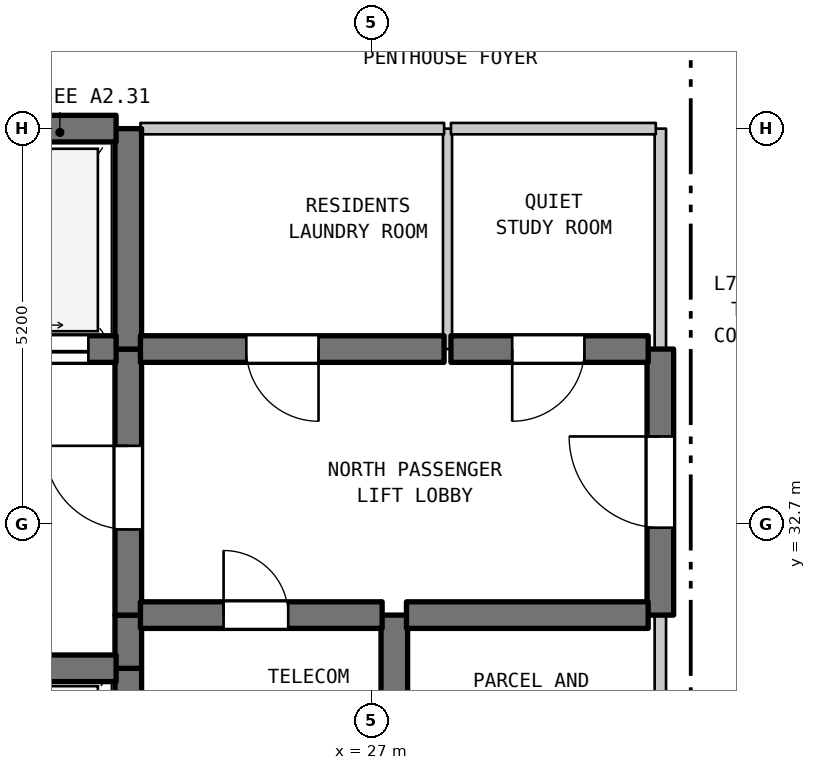
"""IFC4 building model, lengths in metres.
Left out: names, types, materials, properties, quantities, classifications, styles, units other than length and angle.
Written with IfcOpenShell. Run it as: python <this file> out.ifc"""

import sys

from ifc_helpers import new_model, si_unit, direction, frame, frame_2d, origin, place, context, subcontext, project, spatial, rectangle, extrude, element, fill, save


model = new_model("IFC4")
c1 = context("Model", 3, precision=1e-05, world=origin(), true_north=direction((0.0, 1.0)))
c2 = subcontext(c1, "Body", "Model", "MODEL_VIEW")
j1 = project(units=[si_unit("LENGTHUNIT", "METRE"), si_unit("PLANEANGLEUNIT", "RADIAN")], contexts=[c1])
p1 = place(None, origin())
s1 = spatial("IfcSite", under=j1, at=p1, CompositionType="ELEMENT")
p2 = place(p1, origin())
s2 = spatial("IfcBuilding", under=s1, at=p2, CompositionType="ELEMENT")
p3 = place(p2, frame((0.0, 0.0, 303.6)))
s3 = spatial("IfcBuildingStorey", under=s2, at=p3, CompositionType="ELEMENT", Elevation=303.6)
p4 = place(p3, frame((23.8, 28.2, 0.0), z_axis=(0.0, 0.0, 1.0), x_axis=(0.0, 1.0, 0.0)))
e1 = element("IfcWall", 1, at=p4, inside=s3, PredefinedType="SHEAR", context=c2, shape_type="SweptSolid", body=[
    extrude(rectangle(XDim=2.6, YDim=0.35, at=frame_2d((1.3, 0.0))), origin(), (0.0, 0.0, 1.0), 3.39),
])
p5 = place(p3, frame((23.8, 30.8, 0.0), z_axis=(0.0, 0.0, 1.0), x_axis=(0.0, 1.0, 0.0)))
e2 = element("IfcWall", 2, at=p5, inside=s3, PredefinedType="SHEAR", context=c2, shape_type="SweptSolid", body=[
    extrude(rectangle(XDim=0.7, YDim=0.35, at=frame_2d((0.35, 0.0))), origin(), (0.0, 0.0, 1.0), 3.39),
])
p6 = place(p3, frame((23.8, 31.5, 0.0), z_axis=(0.0, 0.0, 1.0), x_axis=(0.0, 1.0, 0.0)))
e3 = element("IfcWall", 3, at=p6, inside=s3, PredefinedType="SHEAR", context=c2, shape_type="SweptSolid", body=[
    extrude(rectangle(XDim=3.5, YDim=0.35, at=frame_2d((1.75, 0.0))), origin(), (0.0, 0.0, 1.0), 3.39),
])
p7 = place(p6, frame((1.127, 0.0, 0.0)))
e4 = element("IfcOpeningElement", 4, at=p7, cuts=e3, PredefinedType="OPENING", context=c2, shape_type="SweptSolid", body=[
    extrude(rectangle(XDim=1.1, YDim=2.15, at=frame_2d((0.55, 1.075))), frame((0.0, 0.185, 0.0), z_axis=(0.0, -1.0, 0.0), x_axis=(1.0, 0.0, 0.0)), (0.0, 0.0, 1.0), 0.37),
])
p8 = place(p3, frame((23.8, 35.0, 0.0), z_axis=(0.0, 0.0, 1.0), x_axis=(0.0, 1.0, 0.0)))
e5 = element("IfcWall", 5, at=p8, inside=s3, PredefinedType="SHEAR", context=c2, shape_type="SweptSolid", body=[
    extrude(rectangle(XDim=2.9, YDim=0.35, at=frame_2d((1.45, 0.0))), origin(), (0.0, 0.0, 1.0), 3.39),
])
p9 = place(p3, frame((27.3, 28.9, 0.0), z_axis=(0.0, 0.0, 1.0), x_axis=(0.0, 1.0, 0.0)))
e6 = element("IfcWall", 6, at=p9, inside=s3, PredefinedType="SHEAR", context=c2, shape_type="SweptSolid", body=[
    extrude(rectangle(XDim=2.6, YDim=0.35, at=frame_2d((1.3, 0.0))), origin(), (0.0, 0.0, 1.0), 3.39),
])
p10 = place(p3, frame((28.0, 35.0, 0.0), z_axis=(0.0, 0.0, 1.0), x_axis=(0.0, 1.0, 0.0)))
e7 = element("IfcWall", 7, at=p10, inside=s3, PredefinedType="PARTITIONING", context=c2, shape_type="SweptSolid", body=[
    extrude(rectangle(XDim=2.9, YDim=0.12, at=frame_2d((1.45, 0.0))), origin(), (0.0, 0.0, 1.0), 3.39),
])
p11 = place(p3, frame((30.8, 28.9, 0.0), z_axis=(0.0, 0.0, 1.0), x_axis=(0.0, 1.0, 0.0)))
e8 = element("IfcWall", 8, at=p11, inside=s3, PredefinedType="STANDARD", context=c2, shape_type="SweptSolid", body=[
    extrude(rectangle(XDim=2.6, YDim=0.15, at=frame_2d((1.3, 0.0))), origin(), (0.0, 0.0, 1.0), 3.39),
])
p12 = place(p3, frame((30.8, 31.5, 0.0), z_axis=(0.0, 0.0, 1.0), x_axis=(0.0, 1.0, 0.0)))
e9 = element("IfcWall", 9, at=p12, inside=s3, PredefinedType="SHEAR", context=c2, shape_type="SweptSolid", body=[
    extrude(rectangle(XDim=3.5, YDim=0.35, at=frame_2d((1.75, 0.0))), origin(), (0.0, 0.0, 1.0), 3.39),
])
p13 = place(p12, frame((1.15, 0.0, 0.0)))
e10 = element("IfcOpeningElement", 10, at=p13, cuts=e9, PredefinedType="OPENING", context=c2, shape_type="SweptSolid", body=[
    extrude(rectangle(XDim=1.2, YDim=2.2, at=frame_2d((0.6, 1.1))), frame((0.0, 0.185, 0.0), z_axis=(0.0, -1.0, 0.0), x_axis=(1.0, 0.0, 0.0)), (0.0, 0.0, 1.0), 0.37),
])
p14 = place(p3, frame((30.8, 35.0, 0.0), z_axis=(0.0, 0.0, 1.0), x_axis=(0.0, 1.0, 0.0)))
e11 = element("IfcWall", 11, at=p14, inside=s3, PredefinedType="STANDARD", context=c2, shape_type="SweptSolid", body=[
    extrude(rectangle(XDim=2.9, YDim=0.15, at=frame_2d((1.45, 0.0))), origin(), (0.0, 0.0, 1.0), 3.39),
])
p15 = place(p3, frame((19.16, 30.8, 0.0), z_axis=(0.0, 0.0, 1.0), x_axis=(1.0, 0.0, 0.0)))
e12 = element("IfcWall", 12, at=p15, inside=s3, PredefinedType="SHEAR", context=c2, shape_type="SweptSolid", body=[
    extrude(rectangle(XDim=4.48, YDim=0.35, at=frame_2d((2.24, 0.0))), origin(), (0.0, 0.0, 1.0), 3.39),
])
p16 = place(p3, frame((23.96, 31.5, 0.0), z_axis=(0.0, 0.0, 1.0), x_axis=(1.0, 0.0, 0.0)))
e13 = element("IfcWall", 13, at=p16, inside=s3, PredefinedType="SHEAR", context=c2, shape_type="SweptSolid", body=[
    extrude(rectangle(XDim=3.18, YDim=0.35, at=frame_2d((1.59, 0.0))), origin(), (0.0, 0.0, 1.0), 3.39),
])
p17 = place(p16, frame((1.094, 0.0, 0.0)))
e14 = element("IfcOpeningElement", 14, at=p17, cuts=e13, PredefinedType="OPENING", context=c2, shape_type="SweptSolid", body=[
    extrude(rectangle(XDim=0.85, YDim=2.1, at=frame_2d((0.425, 1.05))), frame((0.0, 0.185, 0.0), z_axis=(0.0, -1.0, 0.0), x_axis=(1.0, 0.0, 0.0)), (0.0, 0.0, 1.0), 0.37),
])
p18 = place(p3, frame((27.46, 31.5, 0.0), z_axis=(0.0, 0.0, 1.0), x_axis=(1.0, 0.0, 0.0)))
e15 = element("IfcWall", 15, at=p18, inside=s3, PredefinedType="SHEAR", context=c2, shape_type="SweptSolid", body=[
    extrude(rectangle(XDim=3.18, YDim=0.35, at=frame_2d((1.59, 0.0))), origin(), (0.0, 0.0, 1.0), 3.39),
])
p19 = place(p3, frame((19.16, 35.0, 0.0), z_axis=(0.0, 0.0, 1.0), x_axis=(1.0, 0.0, 0.0)))
e16 = element("IfcWall", 16, at=p19, inside=s3, PredefinedType="SHEAR", context=c2, shape_type="SweptSolid", body=[
    extrude(rectangle(XDim=4.48, YDim=0.35, at=frame_2d((2.24, 0.0))), origin(), (0.0, 0.0, 1.0), 3.39),
])
p20 = place(p19, frame((0.365, 0.0, 0.0)))
e17 = element("IfcOpeningElement", 17, at=p20, cuts=e16, PredefinedType="OPENING", context=c2, shape_type="SweptSolid", body=[
    extrude(rectangle(XDim=1.35, YDim=2.2, at=frame_2d((0.675, 1.1))), frame((0.0, 0.185, 0.0), z_axis=(0.0, -1.0, 0.0), x_axis=(1.0, 0.0, 0.0)), (0.0, 0.0, 1.0), 0.37),
])
p21 = place(p19, frame((2.765, 0.0, 0.0)))
e18 = element("IfcOpeningElement", 18, at=p21, cuts=e16, PredefinedType="OPENING", context=c2, shape_type="SweptSolid", body=[
    extrude(rectangle(XDim=1.35, YDim=2.2, at=frame_2d((0.675, 1.1))), frame((0.0, 0.185, 0.0), z_axis=(0.0, -1.0, 0.0), x_axis=(1.0, 0.0, 0.0)), (0.0, 0.0, 1.0), 0.37),
])
p22 = place(p3, frame((23.96, 35.0, 0.0), z_axis=(0.0, 0.0, 1.0), x_axis=(1.0, 0.0, 0.0)))
e19 = element("IfcWall", 19, at=p22, inside=s3, PredefinedType="SHEAR", context=c2, shape_type="SweptSolid", body=[
    extrude(rectangle(XDim=3.995, YDim=0.35, at=frame_2d((1.998, 0.0))), origin(), (0.0, 0.0, 1.0), 3.39),
])
p23 = place(p22, frame((1.393, 0.0, 0.0)))
e20 = element("IfcOpeningElement", 20, at=p23, cuts=e19, PredefinedType="OPENING", context=c2, shape_type="SweptSolid", body=[
    extrude(rectangle(XDim=0.95, YDim=2.15, at=frame_2d((0.475, 1.075))), frame((0.0, 0.185, 0.0), z_axis=(0.0, -1.0, 0.0), x_axis=(1.0, 0.0, 0.0)), (0.0, 0.0, 1.0), 0.37),
])
p24 = place(p3, frame((28.045, 35.0, 0.0), z_axis=(0.0, 0.0, 1.0), x_axis=(1.0, 0.0, 0.0)))
e21 = element("IfcWall", 21, at=p24, inside=s3, PredefinedType="SHEAR", context=c2, shape_type="SweptSolid", body=[
    extrude(rectangle(XDim=2.595, YDim=0.35, at=frame_2d((1.297, 0.0))), origin(), (0.0, 0.0, 1.0), 3.39),
])
p25 = place(p24, frame((0.806, 0.0, 0.0)))
e22 = element("IfcOpeningElement", 22, at=p25, cuts=e21, PredefinedType="OPENING", context=c2, shape_type="SweptSolid", body=[
    extrude(rectangle(XDim=0.95, YDim=2.15, at=frame_2d((0.475, 1.075))), frame((0.0, 0.185, 0.0), z_axis=(0.0, -1.0, 0.0), x_axis=(1.0, 0.0, 0.0)), (0.0, 0.0, 1.0), 0.37),
])
p26 = place(p3, frame((19.16, 37.9, 0.0), z_axis=(0.0, 0.0, 1.0), x_axis=(1.0, 0.0, 0.0)))
e23 = element("IfcWall", 23, at=p26, inside=s3, PredefinedType="SHEAR", context=c2, shape_type="SweptSolid", body=[
    extrude(rectangle(XDim=4.48, YDim=0.35, at=frame_2d((2.24, 0.0))), origin(), (0.0, 0.0, 1.0), 3.39),
])
p27 = place(p3, frame((23.96, 37.9, 0.0), z_axis=(0.0, 0.0, 1.0), x_axis=(1.0, 0.0, 0.0)))
e24 = element("IfcWall", 24, at=p27, inside=s3, PredefinedType="STANDARD", context=c2, shape_type="SweptSolid", body=[
    extrude(rectangle(XDim=3.995, YDim=0.15, at=frame_2d((1.998, 0.0))), origin(), (0.0, 0.0, 1.0), 2.89),
])
p28 = place(p3, frame((28.045, 37.9, 0.0), z_axis=(0.0, 0.0, 1.0), x_axis=(1.0, 0.0, 0.0)))
e25 = element("IfcWall", 25, at=p28, inside=s3, PredefinedType="STANDARD", context=c2, shape_type="SweptSolid", body=[
    extrude(rectangle(XDim=2.695, YDim=0.15, at=frame_2d((1.348, 0.0))), origin(), (0.0, 0.0, 1.0), 2.89),
])
p29 = place(p7, origin())
e26 = element("IfcDoor", 26, at=p29, inside=s3, OperationType="SINGLE_SWING_RIGHT", PredefinedType="DOOR", context=c2, shape_type="SweptSolid", body=[
    extrude(rectangle(XDim=1.1, YDim=2.15, at=frame_2d((0.55, 1.075))), frame((0.0, 0.025, 0.0), z_axis=(0.0, -1.0, 0.0), x_axis=(1.0, 0.0, 0.0)), (0.0, 0.0, 1.0), 0.05),
])
fill(e4, e26)
p30 = place(p13, origin())
e27 = element("IfcDoor", 27, at=p30, inside=s3, OperationType="SINGLE_SWING_RIGHT", PredefinedType="DOOR", context=c2, shape_type="SweptSolid", body=[
    extrude(rectangle(XDim=1.2, YDim=2.2, at=frame_2d((0.6, 1.1))), frame((0.0, 0.025, 0.0), z_axis=(0.0, -1.0, 0.0), x_axis=(1.0, 0.0, 0.0)), (0.0, 0.0, 1.0), 0.05),
])
fill(e10, e27)
p31 = place(p17, origin())
e28 = element("IfcDoor", 28, at=p31, inside=s3, OperationType="SINGLE_SWING_LEFT", PredefinedType="DOOR", context=c2, shape_type="SweptSolid", body=[
    extrude(rectangle(XDim=0.85, YDim=2.1, at=frame_2d((0.425, 1.05))), frame((0.0, 0.025, 0.0), z_axis=(0.0, -1.0, 0.0), x_axis=(1.0, 0.0, 0.0)), (0.0, 0.0, 1.0), 0.05),
])
fill(e14, e28)
p32 = place(p21, origin())
e29 = element("IfcDoor", 29, at=p32, inside=s3, OperationType="DOUBLE_DOOR_SLIDING", PredefinedType="DOOR", context=c2, shape_type="SweptSolid", body=[
    extrude(rectangle(XDim=1.35, YDim=2.2, at=frame_2d((0.675, 1.1))), frame((0.0, 0.025, 0.0), z_axis=(0.0, -1.0, 0.0), x_axis=(1.0, 0.0, 0.0)), (0.0, 0.0, 1.0), 0.05),
])
fill(e18, e29)
p33 = place(p23, frame((0.95, 0.0, 0.0), z_axis=(0.0, 0.0, 1.0), x_axis=(-1.0, 0.0, 0.0)))
e30 = element("IfcDoor", 30, at=p33, inside=s3, OperationType="SINGLE_SWING_RIGHT", PredefinedType="DOOR", context=c2, shape_type="SweptSolid", body=[
    extrude(rectangle(XDim=0.95, YDim=2.15, at=frame_2d((0.475, 1.075))), frame((0.0, 0.025, 0.0), z_axis=(0.0, -1.0, 0.0), x_axis=(1.0, 0.0, 0.0)), (0.0, 0.0, 1.0), 0.05),
])
fill(e20, e30)
p34 = place(p25, frame((0.95, 0.0, 0.0), z_axis=(0.0, 0.0, 1.0), x_axis=(-1.0, 0.0, 0.0)))
e31 = element("IfcDoor", 31, at=p34, inside=s3, OperationType="SINGLE_SWING_LEFT", PredefinedType="DOOR", context=c2, shape_type="SweptSolid", body=[
    extrude(rectangle(XDim=0.95, YDim=2.15, at=frame_2d((0.475, 1.075))), frame((0.0, 0.025, 0.0), z_axis=(0.0, -1.0, 0.0), x_axis=(1.0, 0.0, 0.0)), (0.0, 0.0, 1.0), 0.05),
])
fill(e22, e31)
save(model, sys.argv[1])
